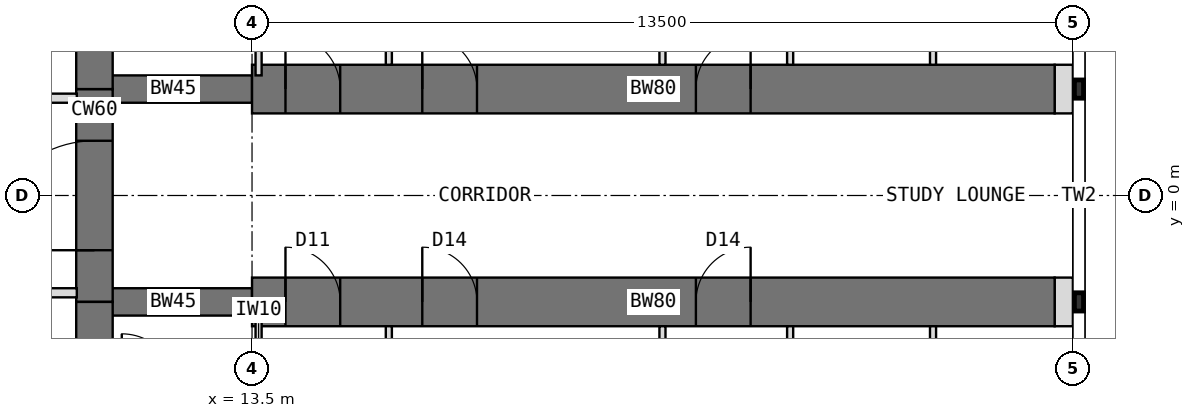
"""IFC4 building model, lengths in metres.
Left out: names, types, materials, properties, quantities, classifications, styles, units other than length and angle.
Written with IfcOpenShell. Run it as: python <this file> out.ifc"""

import sys

from ifc_helpers import new_model, si_unit, direction, frame, frame_2d, origin, place, context, subcontext, project, spatial, rectangle, extrude, element, fill, save


model = new_model("IFC4")
c1 = context("Model", 3, precision=1e-05, world=origin(), true_north=direction((0.0, 1.0)))
c2 = subcontext(c1, "Body", "Model", "MODEL_VIEW")
j1 = project(units=[si_unit("LENGTHUNIT", "METRE"), si_unit("PLANEANGLEUNIT", "RADIAN")], contexts=[c1])
p1 = place(None, origin())
s1 = spatial("IfcSite", under=j1, at=p1, CompositionType="ELEMENT")
p2 = place(p1, origin())
s2 = spatial("IfcBuilding", under=s1, at=p2, CompositionType="ELEMENT")
p3 = place(p2, frame((0.0, 0.0, 145.5)))
s3 = spatial("IfcBuildingStorey", under=s2, at=p3, CompositionType="ELEMENT", Elevation=145.5)
p4 = place(p3, frame((10.908, -6.298, 0.0), z_axis=(0.0, 0.0, 1.0), x_axis=(0.0, 1.0, 0.0)))
e1 = element("IfcWall", 1, at=p4, inside=s3, PredefinedType="SHEAR", context=c2, shape_type="SweptSolid", body=[
    extrude(rectangle(XDim=4.548, YDim=0.6, at=frame_2d((2.274, 0.0))), origin(), (0.0, 0.0, 1.0), 4.0),
])
p5 = place(p3, frame((10.908, -1.75, 0.0), z_axis=(0.0, 0.0, 1.0), x_axis=(0.0, 1.0, 0.0)))
e2 = element("IfcWall", 2, at=p5, inside=s3, PredefinedType="SHEAR", context=c2, shape_type="SweptSolid", body=[
    extrude(rectangle(XDim=3.5, YDim=0.6, at=frame_2d((1.75, 0.0))), origin(), (0.0, 0.0, 1.0), 4.0),
])
p6 = place(p5, frame((0.85, 0.0, 0.0)))
e3 = element("IfcOpeningElement", 3, at=p6, cuts=e2, PredefinedType="OPENING", context=c2, shape_type="SweptSolid", body=[
    extrude(rectangle(XDim=1.8, YDim=2.1, at=frame_2d((0.9, 1.05))), frame((0.0, 0.31, 0.0), z_axis=(0.0, -1.0, 0.0), x_axis=(1.0, 0.0, 0.0)), (0.0, 0.0, 1.0), 0.62),
])
p7 = place(p3, frame((10.908, 1.75, 0.0), z_axis=(0.0, 0.0, 1.0), x_axis=(0.0, 1.0, 0.0)))
e4 = element("IfcWall", 4, at=p7, inside=s3, PredefinedType="SHEAR", context=c2, shape_type="SweptSolid", body=[
    extrude(rectangle(XDim=4.548, YDim=0.6, at=frame_2d((2.274, 0.0))), origin(), (0.0, 0.0, 1.0), 4.0),
])
p8 = place(p3, frame((10.908, 1.75, 0.0), z_axis=(0.0, 0.0, 1.0), x_axis=(1.0, 0.0, 0.0)))
e5 = element("IfcWall", 5, at=p8, inside=s3, PredefinedType="SHEAR", context=c2, shape_type="SweptSolid", body=[
    extrude(rectangle(XDim=2.592, YDim=0.45, at=frame_2d((1.296, 0.0))), origin(), (0.0, 0.0, 1.0), 4.0),
])
p9 = place(p3, frame((13.5, 1.75, 0.0), z_axis=(0.0, 0.0, 1.0), x_axis=(1.0, 0.0, 0.0)))
e6 = element("IfcWall", 6, at=p9, inside=s3, PredefinedType="SHEAR", context=c2, shape_type="SweptSolid", body=[
    extrude(rectangle(XDim=13.2, YDim=0.8, at=frame_2d((6.6, 0.0))), origin(), (0.0, 0.0, 1.0), 4.0),
])
p10 = place(p9, frame((0.55, 0.0, 0.0)))
e7 = element("IfcOpeningElement", 7, at=p10, cuts=e6, PredefinedType="OPENING", context=c2, shape_type="SweptSolid", body=[
    extrude(rectangle(XDim=0.9, YDim=2.1, at=frame_2d((0.45, 1.05))), frame((0.0, 0.41, 0.0), z_axis=(0.0, -1.0, 0.0), x_axis=(1.0, 0.0, 0.0)), (0.0, 0.0, 1.0), 0.82),
])
p11 = place(p9, frame((2.8, 0.0, 0.0)))
e8 = element("IfcOpeningElement", 8, at=p11, cuts=e6, PredefinedType="OPENING", context=c2, shape_type="SweptSolid", body=[
    extrude(rectangle(XDim=0.9, YDim=2.1, at=frame_2d((0.45, 1.05))), frame((0.0, 0.41, 0.0), z_axis=(0.0, -1.0, 0.0), x_axis=(1.0, 0.0, 0.0)), (0.0, 0.0, 1.0), 0.82),
])
p12 = place(p9, frame((7.3, 0.0, 0.0)))
e9 = element("IfcOpeningElement", 9, at=p12, cuts=e6, PredefinedType="OPENING", context=c2, shape_type="SweptSolid", body=[
    extrude(rectangle(XDim=0.9, YDim=2.1, at=frame_2d((0.45, 1.05))), frame((0.0, 0.41, 0.0), z_axis=(0.0, -1.0, 0.0), x_axis=(1.0, 0.0, 0.0)), (0.0, 0.0, 1.0), 0.82),
])
p13 = place(p3, frame((10.908, -1.75, 0.0), z_axis=(0.0, 0.0, 1.0), x_axis=(1.0, 0.0, 0.0)))
e10 = element("IfcWall", 10, at=p13, inside=s3, PredefinedType="SHEAR", context=c2, shape_type="SweptSolid", body=[
    extrude(rectangle(XDim=2.592, YDim=0.45, at=frame_2d((1.296, 0.0))), origin(), (0.0, 0.0, 1.0), 4.0),
])
p14 = place(p3, frame((13.5, -1.75, 0.0), z_axis=(0.0, 0.0, 1.0), x_axis=(1.0, 0.0, 0.0)))
e11 = element("IfcWall", 11, at=p14, inside=s3, PredefinedType="SHEAR", context=c2, shape_type="SweptSolid", body=[
    extrude(rectangle(XDim=13.2, YDim=0.8, at=frame_2d((6.6, 0.0))), origin(), (0.0, 0.0, 1.0), 4.0),
])
p15 = place(p14, frame((0.55, 0.0, 0.0)))
e12 = element("IfcOpeningElement", 12, at=p15, cuts=e11, PredefinedType="OPENING", context=c2, shape_type="SweptSolid", body=[
    extrude(rectangle(XDim=0.9, YDim=2.1, at=frame_2d((0.45, 1.05))), frame((0.0, 0.41, 0.0), z_axis=(0.0, -1.0, 0.0), x_axis=(1.0, 0.0, 0.0)), (0.0, 0.0, 1.0), 0.82),
])
p16 = place(p14, frame((2.8, 0.0, 0.0)))
e13 = element("IfcOpeningElement", 13, at=p16, cuts=e11, PredefinedType="OPENING", context=c2, shape_type="SweptSolid", body=[
    extrude(rectangle(XDim=0.9, YDim=2.1, at=frame_2d((0.45, 1.05))), frame((0.0, 0.41, 0.0), z_axis=(0.0, -1.0, 0.0), x_axis=(1.0, 0.0, 0.0)), (0.0, 0.0, 1.0), 0.82),
])
p17 = place(p14, frame((7.3, 0.0, 0.0)))
e14 = element("IfcOpeningElement", 14, at=p17, cuts=e11, PredefinedType="OPENING", context=c2, shape_type="SweptSolid", body=[
    extrude(rectangle(XDim=0.9, YDim=2.1, at=frame_2d((0.45, 1.05))), frame((0.0, 0.41, 0.0), z_axis=(0.0, -1.0, 0.0), x_axis=(1.0, 0.0, 0.0)), (0.0, 0.0, 1.0), 0.82),
])
for number, where, z_axis, x_axis in (
    (15, (26.7, 1.75, 0.0), (0.0, 0.0, 1.0), (1.0, 0.0, 0.0)),
    (16, (26.7, -1.75, 0.0), (0.0, 0.0, 1.0), (1.0, 0.0, 0.0)),
):
    element("IfcWall", number, at=place(p3, frame(where, z_axis=z_axis, x_axis=x_axis)), inside=s3, PredefinedType="PARTITIONING", context=c2, shape_type="SweptSolid", body=[
        extrude(rectangle(XDim=0.3, YDim=0.8, at=frame_2d((0.15, 0.0))), origin(), (0.0, 0.0, 1.0), 3.8),
    ])
for number, where, z_axis, x_axis in (
    (17, (15.75, 2.15, 0.0), (0.0, 0.0, 1.0), (0.0, 1.0, 0.0)),
    (18, (20.25, 2.15, 0.0), (0.0, 0.0, 1.0), (0.0, 1.0, 0.0)),
):
    element("IfcWall", number, at=place(p3, frame(where, z_axis=z_axis, x_axis=x_axis)), inside=s3, PredefinedType="PARTITIONING", context=c2, shape_type="SweptSolid", body=[
        extrude(rectangle(XDim=4.6, YDim=0.1, at=frame_2d((2.3, 0.0))), origin(), (0.0, 0.0, 1.0), 3.8),
    ])
p18 = place(p3, frame((22.35, 2.15, 0.0), z_axis=(0.0, 0.0, 1.0), x_axis=(0.0, 1.0, 0.0)))
e19 = element("IfcWall", 19, at=p18, inside=s3, PredefinedType="PARTITIONING", context=c2, shape_type="SweptSolid", body=[
    extrude(rectangle(XDim=2.4, YDim=0.1, at=frame_2d((1.2, 0.0))), origin(), (0.0, 0.0, 1.0), 3.8),
])
p19 = place(p18, frame((0.75, 0.0, 0.0)))
e20 = element("IfcOpeningElement", 20, at=p19, cuts=e19, PredefinedType="OPENING", context=c2, shape_type="SweptSolid", body=[
    extrude(rectangle(XDim=0.9, YDim=2.1, at=frame_2d((0.45, 1.05))), frame((0.0, 0.06, 0.0), z_axis=(0.0, -1.0, 0.0), x_axis=(1.0, 0.0, 0.0)), (0.0, 0.0, 1.0), 0.12),
])
p20 = place(p3, frame((24.7, 2.15, 0.0), z_axis=(0.0, 0.0, 1.0), x_axis=(0.0, 1.0, 0.0)))
e21 = element("IfcWall", 21, at=p20, inside=s3, PredefinedType="PARTITIONING", context=c2, shape_type="SweptSolid", body=[
    extrude(rectangle(XDim=2.4, YDim=0.1, at=frame_2d((1.2, 0.0))), origin(), (0.0, 0.0, 1.0), 3.8),
])
p21 = place(p3, frame((13.608, 1.975, 0.0), z_axis=(0.0, 0.0, 1.0), x_axis=(0.0, 1.0, 0.0)))
e22 = element("IfcWall", 22, at=p21, inside=s3, PredefinedType="PARTITIONING", context=c2, shape_type="SweptSolid", body=[
    extrude(rectangle(XDim=3.2, YDim=0.1, at=frame_2d((1.6, 0.0))), origin(), (0.0, 0.0, 1.0), 3.8),
])
for number, where, z_axis, x_axis in (
    (23, (15.75, -2.15, 0.0), (0.0, 0.0, 1.0), (0.0, -1.0, 0.0)),
    (24, (20.25, -2.15, 0.0), (0.0, 0.0, 1.0), (0.0, -1.0, 0.0)),
):
    element("IfcWall", number, at=place(p3, frame(where, z_axis=z_axis, x_axis=x_axis)), inside=s3, PredefinedType="PARTITIONING", context=c2, shape_type="SweptSolid", body=[
        extrude(rectangle(XDim=4.6, YDim=0.1, at=frame_2d((2.3, 0.0))), origin(), (0.0, 0.0, 1.0), 3.8),
    ])
p22 = place(p3, frame((22.35, -2.15, 0.0), z_axis=(0.0, 0.0, 1.0), x_axis=(0.0, -1.0, 0.0)))
e25 = element("IfcWall", 25, at=p22, inside=s3, PredefinedType="PARTITIONING", context=c2, shape_type="SweptSolid", body=[
    extrude(rectangle(XDim=2.4, YDim=0.1, at=frame_2d((1.2, 0.0))), origin(), (0.0, 0.0, 1.0), 3.8),
])
p23 = place(p22, frame((0.75, 0.0, 0.0)))
e26 = element("IfcOpeningElement", 26, at=p23, cuts=e25, PredefinedType="OPENING", context=c2, shape_type="SweptSolid", body=[
    extrude(rectangle(XDim=0.9, YDim=2.1, at=frame_2d((0.45, 1.05))), frame((0.0, 0.06, 0.0), z_axis=(0.0, -1.0, 0.0), x_axis=(1.0, 0.0, 0.0)), (0.0, 0.0, 1.0), 0.12),
])
p24 = place(p3, frame((24.7, -2.15, 0.0), z_axis=(0.0, 0.0, 1.0), x_axis=(0.0, -1.0, 0.0)))
e27 = element("IfcWall", 27, at=p24, inside=s3, PredefinedType="PARTITIONING", context=c2, shape_type="SweptSolid", body=[
    extrude(rectangle(XDim=2.4, YDim=0.1, at=frame_2d((1.2, 0.0))), origin(), (0.0, 0.0, 1.0), 3.8),
])
p25 = place(p3, frame((13.608, -1.975, 0.0), z_axis=(0.0, 0.0, 1.0), x_axis=(0.0, -1.0, 0.0)))
e28 = element("IfcWall", 28, at=p25, inside=s3, PredefinedType="PARTITIONING", context=c2, shape_type="SweptSolid", body=[
    extrude(rectangle(XDim=1.2, YDim=0.1, at=frame_2d((0.6, 0.0))), origin(), (0.0, 0.0, 1.0), 3.8),
])
p26 = place(p3, frame((6.1, 1.6, 0.0), z_axis=(0.0, 0.0, 1.0), x_axis=(1.0, 0.0, 0.0)))
e29 = element("IfcWall", 29, at=p26, inside=s3, PredefinedType="PARTITIONING", context=c2, shape_type="SweptSolid", body=[
    extrude(rectangle(XDim=4.519, YDim=0.15, at=frame_2d((2.259, 0.0))), origin(), (0.0, 0.0, 1.0), 3.8),
])
p27 = place(p26, frame((1.769, 0.0, 0.0)))
e30 = element("IfcOpeningElement", 30, at=p27, cuts=e29, PredefinedType="OPENING", context=c2, shape_type="SweptSolid", body=[
    extrude(rectangle(XDim=1.0, YDim=2.1, at=frame_2d((0.5, 1.05))), frame((0.0, 0.085, 0.0), z_axis=(0.0, -1.0, 0.0), x_axis=(1.0, 0.0, 0.0)), (0.0, 0.0, 1.0), 0.17),
])
p28 = place(p3, frame((10.618, -1.6, 0.0), z_axis=(0.0, 0.0, 1.0), x_axis=(-1.0, 0.0, 0.0)))
e31 = element("IfcWall", 31, at=p28, inside=s3, PredefinedType="PARTITIONING", context=c2, shape_type="SweptSolid", body=[
    extrude(rectangle(XDim=4.519, YDim=0.15, at=frame_2d((2.259, 0.0))), origin(), (0.0, 0.0, 1.0), 3.8),
])
p29 = place(p28, frame((1.749, 0.0, 0.0)))
e32 = element("IfcOpeningElement", 32, at=p29, cuts=e31, PredefinedType="OPENING", context=c2, shape_type="SweptSolid", body=[
    extrude(rectangle(XDim=1.0, YDim=2.1, at=frame_2d((0.5, 1.05))), frame((0.0, 0.085, 0.0), z_axis=(0.0, -1.0, 0.0), x_axis=(1.0, 0.0, 0.0)), (0.0, 0.0, 1.0), 0.17),
])
p30 = place(p6, origin())
e33 = element("IfcDoor", 33, at=p30, inside=s3, OperationType="DOUBLE_DOOR_DOUBLE_SWING", PredefinedType="DOOR", context=c2, shape_type="SweptSolid", body=[
    extrude(rectangle(XDim=1.72, YDim=2.06, at=frame_2d((0.9, 1.03))), frame((0.0, 0.025, 0.0), z_axis=(0.0, -1.0, 0.0), x_axis=(1.0, 0.0, 0.0)), (0.0, 0.0, 1.0), 0.05),
    extrude(rectangle(XDim=0.04, YDim=2.1, at=frame_2d((0.02, 1.05))), frame((0.0, 0.3, 0.0), z_axis=(0.0, -1.0, 0.0), x_axis=(1.0, 0.0, 0.0)), (0.0, 0.0, 1.0), 0.6),
    extrude(rectangle(XDim=0.04, YDim=2.1, at=frame_2d((1.78, 1.05))), frame((0.0, 0.3, 0.0), z_axis=(0.0, -1.0, 0.0), x_axis=(1.0, 0.0, 0.0)), (0.0, 0.0, 1.0), 0.6),
    extrude(rectangle(XDim=1.72, YDim=0.04, at=frame_2d((0.9, 2.08))), frame((0.0, 0.3, 0.0), z_axis=(0.0, -1.0, 0.0), x_axis=(1.0, 0.0, 0.0)), (0.0, 0.0, 1.0), 0.6),
])
fill(e3, e33)
p31 = place(p10, origin())
e34 = element("IfcDoor", 34, at=p31, inside=s3, OperationType="SINGLE_SWING_LEFT", PredefinedType="DOOR", context=c2, shape_type="SweptSolid", body=[
    extrude(rectangle(XDim=0.82, YDim=2.06, at=frame_2d((0.45, 1.03))), frame((0.0, 0.025, 0.0), z_axis=(0.0, -1.0, 0.0), x_axis=(1.0, 0.0, 0.0)), (0.0, 0.0, 1.0), 0.05),
    extrude(rectangle(XDim=0.04, YDim=2.1, at=frame_2d((0.02, 1.05))), frame((0.0, 0.4, 0.0), z_axis=(0.0, -1.0, 0.0), x_axis=(1.0, 0.0, 0.0)), (0.0, 0.0, 1.0), 0.8),
    extrude(rectangle(XDim=0.04, YDim=2.1, at=frame_2d((0.88, 1.05))), frame((0.0, 0.4, 0.0), z_axis=(0.0, -1.0, 0.0), x_axis=(1.0, 0.0, 0.0)), (0.0, 0.0, 1.0), 0.8),
    extrude(rectangle(XDim=0.82, YDim=0.04, at=frame_2d((0.45, 2.08))), frame((0.0, 0.4, 0.0), z_axis=(0.0, -1.0, 0.0), x_axis=(1.0, 0.0, 0.0)), (0.0, 0.0, 1.0), 0.8),
])
fill(e7, e34)
p32 = place(p11, origin())
e35 = element("IfcDoor", 35, at=p32, inside=s3, OperationType="SINGLE_SWING_LEFT", PredefinedType="DOOR", context=c2, shape_type="SweptSolid", body=[
    extrude(rectangle(XDim=0.82, YDim=2.06, at=frame_2d((0.45, 1.03))), frame((0.0, 0.025, 0.0), z_axis=(0.0, -1.0, 0.0), x_axis=(1.0, 0.0, 0.0)), (0.0, 0.0, 1.0), 0.05),
    extrude(rectangle(XDim=0.04, YDim=2.1, at=frame_2d((0.02, 1.05))), frame((0.0, 0.4, 0.0), z_axis=(0.0, -1.0, 0.0), x_axis=(1.0, 0.0, 0.0)), (0.0, 0.0, 1.0), 0.8),
    extrude(rectangle(XDim=0.04, YDim=2.1, at=frame_2d((0.88, 1.05))), frame((0.0, 0.4, 0.0), z_axis=(0.0, -1.0, 0.0), x_axis=(1.0, 0.0, 0.0)), (0.0, 0.0, 1.0), 0.8),
    extrude(rectangle(XDim=0.82, YDim=0.04, at=frame_2d((0.45, 2.08))), frame((0.0, 0.4, 0.0), z_axis=(0.0, -1.0, 0.0), x_axis=(1.0, 0.0, 0.0)), (0.0, 0.0, 1.0), 0.8),
])
fill(e8, e35)
p33 = place(p12, origin())
e36 = element("IfcDoor", 36, at=p33, inside=s3, OperationType="SINGLE_SWING_RIGHT", PredefinedType="DOOR", context=c2, shape_type="SweptSolid", body=[
    extrude(rectangle(XDim=0.82, YDim=2.06, at=frame_2d((0.45, 1.03))), frame((0.0, 0.025, 0.0), z_axis=(0.0, -1.0, 0.0), x_axis=(1.0, 0.0, 0.0)), (0.0, 0.0, 1.0), 0.05),
    extrude(rectangle(XDim=0.04, YDim=2.1, at=frame_2d((0.02, 1.05))), frame((0.0, 0.4, 0.0), z_axis=(0.0, -1.0, 0.0), x_axis=(1.0, 0.0, 0.0)), (0.0, 0.0, 1.0), 0.8),
    extrude(rectangle(XDim=0.04, YDim=2.1, at=frame_2d((0.88, 1.05))), frame((0.0, 0.4, 0.0), z_axis=(0.0, -1.0, 0.0), x_axis=(1.0, 0.0, 0.0)), (0.0, 0.0, 1.0), 0.8),
    extrude(rectangle(XDim=0.82, YDim=0.04, at=frame_2d((0.45, 2.08))), frame((0.0, 0.4, 0.0), z_axis=(0.0, -1.0, 0.0), x_axis=(1.0, 0.0, 0.0)), (0.0, 0.0, 1.0), 0.8),
])
fill(e9, e36)
p34 = place(p15, origin())
e37 = element("IfcDoor", 37, at=p34, inside=s3, OperationType="SINGLE_SWING_LEFT", PredefinedType="DOOR", context=c2, shape_type="SweptSolid", body=[
    extrude(rectangle(XDim=0.82, YDim=2.06, at=frame_2d((0.45, 1.03))), frame((0.0, 0.025, 0.0), z_axis=(0.0, -1.0, 0.0), x_axis=(1.0, 0.0, 0.0)), (0.0, 0.0, 1.0), 0.05),
    extrude(rectangle(XDim=0.04, YDim=2.1, at=frame_2d((0.02, 1.05))), frame((0.0, 0.4, 0.0), z_axis=(0.0, -1.0, 0.0), x_axis=(1.0, 0.0, 0.0)), (0.0, 0.0, 1.0), 0.8),
    extrude(rectangle(XDim=0.04, YDim=2.1, at=frame_2d((0.88, 1.05))), frame((0.0, 0.4, 0.0), z_axis=(0.0, -1.0, 0.0), x_axis=(1.0, 0.0, 0.0)), (0.0, 0.0, 1.0), 0.8),
    extrude(rectangle(XDim=0.82, YDim=0.04, at=frame_2d((0.45, 2.08))), frame((0.0, 0.4, 0.0), z_axis=(0.0, -1.0, 0.0), x_axis=(1.0, 0.0, 0.0)), (0.0, 0.0, 1.0), 0.8),
])
fill(e12, e37)
p35 = place(p16, origin())
e38 = element("IfcDoor", 38, at=p35, inside=s3, OperationType="SINGLE_SWING_LEFT", PredefinedType="DOOR", context=c2, shape_type="SweptSolid", body=[
    extrude(rectangle(XDim=0.82, YDim=2.06, at=frame_2d((0.45, 1.03))), frame((0.0, 0.025, 0.0), z_axis=(0.0, -1.0, 0.0), x_axis=(1.0, 0.0, 0.0)), (0.0, 0.0, 1.0), 0.05),
    extrude(rectangle(XDim=0.04, YDim=2.1, at=frame_2d((0.02, 1.05))), frame((0.0, 0.4, 0.0), z_axis=(0.0, -1.0, 0.0), x_axis=(1.0, 0.0, 0.0)), (0.0, 0.0, 1.0), 0.8),
    extrude(rectangle(XDim=0.04, YDim=2.1, at=frame_2d((0.88, 1.05))), frame((0.0, 0.4, 0.0), z_axis=(0.0, -1.0, 0.0), x_axis=(1.0, 0.0, 0.0)), (0.0, 0.0, 1.0), 0.8),
    extrude(rectangle(XDim=0.82, YDim=0.04, at=frame_2d((0.45, 2.08))), frame((0.0, 0.4, 0.0), z_axis=(0.0, -1.0, 0.0), x_axis=(1.0, 0.0, 0.0)), (0.0, 0.0, 1.0), 0.8),
])
fill(e13, e38)
p36 = place(p17, origin())
e39 = element("IfcDoor", 39, at=p36, inside=s3, OperationType="SINGLE_SWING_RIGHT", PredefinedType="DOOR", context=c2, shape_type="SweptSolid", body=[
    extrude(rectangle(XDim=0.82, YDim=2.06, at=frame_2d((0.45, 1.03))), frame((0.0, 0.025, 0.0), z_axis=(0.0, -1.0, 0.0), x_axis=(1.0, 0.0, 0.0)), (0.0, 0.0, 1.0), 0.05),
    extrude(rectangle(XDim=0.04, YDim=2.1, at=frame_2d((0.02, 1.05))), frame((0.0, 0.4, 0.0), z_axis=(0.0, -1.0, 0.0), x_axis=(1.0, 0.0, 0.0)), (0.0, 0.0, 1.0), 0.8),
    extrude(rectangle(XDim=0.04, YDim=2.1, at=frame_2d((0.88, 1.05))), frame((0.0, 0.4, 0.0), z_axis=(0.0, -1.0, 0.0), x_axis=(1.0, 0.0, 0.0)), (0.0, 0.0, 1.0), 0.8),
    extrude(rectangle(XDim=0.82, YDim=0.04, at=frame_2d((0.45, 2.08))), frame((0.0, 0.4, 0.0), z_axis=(0.0, -1.0, 0.0), x_axis=(1.0, 0.0, 0.0)), (0.0, 0.0, 1.0), 0.8),
])
fill(e14, e39)
save(model, sys.argv[1])
